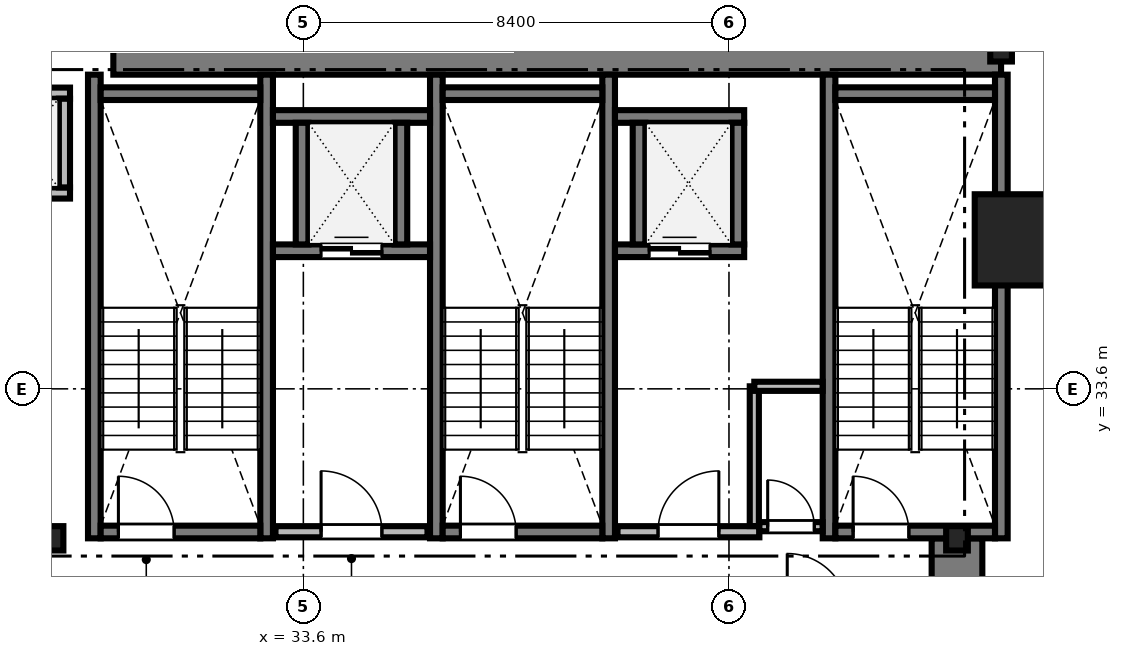
"""IFC4 building model, lengths in metres.
Left out: names, types, materials, properties, quantities, classifications, styles, units other than length and angle.
Written with IfcOpenShell. Run it as: python <this file> out.ifc"""

import sys

from ifc_helpers import new_model, si_unit, direction, frame, frame_2d, origin, origin_2d, place, context, subcontext, project, spatial, rectangle, i_section, extrude, source, transform, mapped, element, fill, save


model = new_model("IFC4")
c1 = context("Model", 3, precision=1e-05, world=origin(), true_north=direction((0.0, 1.0)))
c2 = subcontext(c1, "Body", "Model", "MODEL_VIEW")
j1 = project(units=[si_unit("LENGTHUNIT", "METRE"), si_unit("PLANEANGLEUNIT", "RADIAN")], contexts=[c1])
p1 = place(None, origin())
s1 = spatial("IfcSite", under=j1, at=p1, CompositionType="ELEMENT")
p2 = place(p1, origin())
s2 = spatial("IfcBuilding", under=s1, at=p2, CompositionType="ELEMENT")
p3 = place(p2, frame((0.0, 0.0, 82.35)))
s3 = spatial("IfcBuildingStorey", under=s2, at=p3, CompositionType="ELEMENT", Elevation=82.35)
m1 = source(origin(), c2, "Body", "SweptSolid", [
    extrude(rectangle(XDim=17.52, YDim=1.0, at=frame_2d((8.76, 0.0))), origin(), (0.0, 0.0, 1.0), 3.41),
])
p4 = place(p3, frame((29.85, 40.3, 0.0), z_axis=(0.0, 0.0, 1.0), x_axis=(1.0, 0.0, 0.0)))
e1 = element("IfcWall", 1, at=p4, inside=s3, PredefinedType="SHEAR", context=c2, shape_type="MappedRepresentation", body=[
    mapped(m1, transform((0.0, 0.0, 0.0), scale=1.0)),
])
m2 = source(origin(), c2, "Body", "SweptSolid", [
    extrude(rectangle(XDim=13.15, YDim=1.0, at=frame_2d((6.575, 0.0))), origin(), (0.0, 0.0, 1.0), 3.41),
])
p5 = place(p3, frame((46.5, 17.5, 0.0), z_axis=(0.0, 0.0, 1.0), x_axis=(0.0, 1.0, 0.0)))
e2 = element("IfcWall", 2, at=p5, inside=s3, PredefinedType="SHEAR", context=c2, shape_type="MappedRepresentation", body=[
    mapped(m2, transform((0.0, 0.0, 0.0), scale=1.0)),
])
m3 = source(origin(), c2, "Body", "SweptSolid", [
    extrude(i_section(OverallWidth=0.428, OverallDepth=0.481, WebThickness=0.04, FlangeThickness=0.063, FilletRadius=0.015, at=origin_2d()), origin(), (0.0, 0.0, 1.0), 3.41),
])
for number, where, z_axis, x_axis in (
    (3, (28.65, 30.65, 0.0), (0.0, 0.0, 1.0), (1.0, 0.0, 0.0)),
    (4, (46.5, 30.65, 0.0), (0.0, 0.0, 1.0), (1.0, 0.0, 0.0)),
    (5, (47.37, 40.3, 0.0), (0.0, 0.0, 1.0), (1.0, 0.0, 0.0)),
):
    element("IfcColumn", number, at=place(p3, frame(where, z_axis=z_axis, x_axis=x_axis)), inside=s3, PredefinedType="COLUMN", context=c2, shape_type="MappedRepresentation", body=[
        mapped(m3, transform((0.0, 0.0, 0.0), scale=1.0)),
    ])
m4 = source(origin(), c2, "Body", "SweptSolid", [
    extrude(rectangle(XDim=1.8, YDim=1.8, at=origin_2d()), origin(), (0.0, 0.0, 1.0), 3.41),
])
p6 = place(p3, frame((47.75, 36.54, 0.0), z_axis=(0.0, 0.0, 1.0), x_axis=(1.0, 0.0, 0.0)))
e6 = element("IfcColumn", 6, at=p6, inside=s3, PredefinedType="COLUMN", context=c2, shape_type="MappedRepresentation", body=[
    mapped(m4, transform((0.0, 0.0, 0.0), scale=1.0)),
])
m5 = source(origin(), c2, "Body", "SweptSolid", [
    extrude(rectangle(XDim=9.15, YDim=0.25, at=frame_2d((4.575, 0.0))), origin(), (0.0, 0.0, 1.0), 3.45),
])
for number, where, z_axis, x_axis in (
    (7, (29.475, 30.65, 0.0), (0.0, 0.0, 1.0), (0.0, 1.0, 0.0)),
    (8, (32.875, 30.65, 0.0), (0.0, 0.0, 1.0), (0.0, 1.0, 0.0)),
):
    element("IfcWall", number, at=place(p3, frame(where, z_axis=z_axis, x_axis=x_axis)), inside=s3, PredefinedType="SOLIDWALL", context=c2, shape_type="MappedRepresentation", body=[
        mapped(m5, transform((0.0, 0.0, 0.0), scale=1.0)),
    ])
m6 = source(origin(), c2, "Body", "SweptSolid", [
    extrude(rectangle(XDim=3.15, YDim=0.25, at=frame_2d((1.575, 0.0))), origin(), (0.0, 0.0, 1.0), 3.45),
])
p7 = place(p3, frame((29.6, 39.425, 0.0), z_axis=(0.0, 0.0, 1.0), x_axis=(1.0, 0.0, 0.0)))
e9 = element("IfcWall", 9, at=p7, inside=s3, PredefinedType="SOLIDWALL", context=c2, shape_type="MappedRepresentation", body=[
    mapped(m6, transform((0.0, 0.0, 0.0), scale=1.0)),
])
p8 = place(p3, frame((29.6, 30.775, 0.0), z_axis=(0.0, 0.0, 1.0), x_axis=(1.0, 0.0, 0.0)))
e10 = element("IfcWall", 10, at=p8, inside=s3, PredefinedType="SOLIDWALL", context=c2, shape_type="MappedRepresentation", body=[
    mapped(m6, transform((0.0, 0.0, 0.0), scale=1.0)),
])
m7 = source(origin(), c2, "Body", "SweptSolid", [
    extrude(rectangle(XDim=1.1, YDim=2.2, at=frame_2d((0.55, 1.1))), frame((0.0, 0.135, 0.0), z_axis=(0.0, -1.0, 0.0), x_axis=(1.0, 0.0, 0.0)), (0.0, 0.0, 1.0), 0.27),
])
p9 = place(p8, frame((0.35, 0.0, 0.0)))
e11 = element("IfcOpeningElement", 11, at=p9, cuts=e10, PredefinedType="OPENING", context=c2, shape_type="MappedRepresentation", body=[
    mapped(m7, transform((0.0, 0.0, 0.0), scale=1.0)),
])
for number, where, z_axis, x_axis in (
    (12, (36.225, 30.65, 0.0), (0.0, 0.0, 1.0), (0.0, 1.0, 0.0)),
    (13, (39.625, 30.65, 0.0), (0.0, 0.0, 1.0), (0.0, 1.0, 0.0)),
):
    element("IfcWall", number, at=place(p3, frame(where, z_axis=z_axis, x_axis=x_axis)), inside=s3, PredefinedType="SOLIDWALL", context=c2, shape_type="MappedRepresentation", body=[
        mapped(m5, transform((0.0, 0.0, 0.0), scale=1.0)),
    ])
p10 = place(p3, frame((36.35, 39.425, 0.0), z_axis=(0.0, 0.0, 1.0), x_axis=(1.0, 0.0, 0.0)))
e14 = element("IfcWall", 14, at=p10, inside=s3, PredefinedType="SOLIDWALL", context=c2, shape_type="MappedRepresentation", body=[
    mapped(m6, transform((0.0, 0.0, 0.0), scale=1.0)),
])
p11 = place(p3, frame((36.35, 30.775, 0.0), z_axis=(0.0, 0.0, 1.0), x_axis=(1.0, 0.0, 0.0)))
e15 = element("IfcWall", 15, at=p11, inside=s3, PredefinedType="SOLIDWALL", context=c2, shape_type="MappedRepresentation", body=[
    mapped(m6, transform((0.0, 0.0, 0.0), scale=1.0)),
])
p12 = place(p11, frame((0.35, 0.0, 0.0)))
e16 = element("IfcOpeningElement", 16, at=p12, cuts=e15, PredefinedType="OPENING", context=c2, shape_type="MappedRepresentation", body=[
    mapped(m7, transform((0.0, 0.0, 0.0), scale=1.0)),
])
for number, where, z_axis, x_axis in (
    (17, (43.975, 30.65, 0.0), (0.0, 0.0, 1.0), (0.0, 1.0, 0.0)),
    (18, (47.375, 30.65, 0.0), (0.0, 0.0, 1.0), (0.0, 1.0, 0.0)),
):
    element("IfcWall", number, at=place(p3, frame(where, z_axis=z_axis, x_axis=x_axis)), inside=s3, PredefinedType="SOLIDWALL", context=c2, shape_type="MappedRepresentation", body=[
        mapped(m5, transform((0.0, 0.0, 0.0), scale=1.0)),
    ])
p13 = place(p3, frame((44.1, 39.425, 0.0), z_axis=(0.0, 0.0, 1.0), x_axis=(1.0, 0.0, 0.0)))
e19 = element("IfcWall", 19, at=p13, inside=s3, PredefinedType="SOLIDWALL", context=c2, shape_type="MappedRepresentation", body=[
    mapped(m6, transform((0.0, 0.0, 0.0), scale=1.0)),
])
p14 = place(p3, frame((44.1, 30.775, 0.0), z_axis=(0.0, 0.0, 1.0), x_axis=(1.0, 0.0, 0.0)))
e20 = element("IfcWall", 20, at=p14, inside=s3, PredefinedType="SOLIDWALL", context=c2, shape_type="MappedRepresentation", body=[
    mapped(m6, transform((0.0, 0.0, 0.0), scale=1.0)),
])
p15 = place(p14, frame((0.35, 0.0, 0.0)))
e21 = element("IfcOpeningElement", 21, at=p15, cuts=e20, PredefinedType="OPENING", context=c2, shape_type="MappedRepresentation", body=[
    mapped(m7, transform((0.0, 0.0, 0.0), scale=1.0)),
])
m8 = source(origin(), c2, "Body", "SweptSolid", [
    extrude(rectangle(XDim=3.0, YDim=0.22, at=frame_2d((1.5, 0.0))), origin(), (0.0, 0.0, 1.0), 3.41),
])
p16 = place(p3, frame((33.05, 30.78, 0.0), z_axis=(0.0, 0.0, 1.0), x_axis=(1.0, 0.0, 0.0)))
e22 = element("IfcWall", 22, at=p16, inside=s3, PredefinedType="SOLIDWALL", context=c2, shape_type="MappedRepresentation", body=[
    mapped(m8, transform((0.0, 0.0, 0.0), scale=1.0)),
])
m9 = source(origin(), c2, "Body", "SweptSolid", [
    extrude(rectangle(XDim=1.2, YDim=2.2, at=frame_2d((0.6, 1.1))), frame((0.0, 0.12, 0.0), z_axis=(0.0, -1.0, 0.0), x_axis=(1.0, 0.0, 0.0)), (0.0, 0.0, 1.0), 0.24),
])
p17 = place(p16, frame((0.9, 0.0, 0.0)))
e23 = element("IfcOpeningElement", 23, at=p17, cuts=e22, PredefinedType="OPENING", context=c2, shape_type="MappedRepresentation", body=[
    mapped(m9, transform((0.0, 0.0, 0.0), scale=1.0)),
])
m10 = source(origin(), c2, "Body", "SweptSolid", [
    extrude(rectangle(XDim=2.8, YDim=0.22, at=frame_2d((1.4, 0.0))), origin(), (0.0, 0.0, 1.0), 3.41),
])
p18 = place(p3, frame((39.8, 30.78, 0.0), z_axis=(0.0, 0.0, 1.0), x_axis=(1.0, 0.0, 0.0)))
e24 = element("IfcWall", 24, at=p18, inside=s3, PredefinedType="SOLIDWALL", context=c2, shape_type="MappedRepresentation", body=[
    mapped(m10, transform((0.0, 0.0, 0.0), scale=1.0)),
])
p19 = place(p18, frame((0.8, 0.0, 0.0)))
e25 = element("IfcOpeningElement", 25, at=p19, cuts=e24, PredefinedType="OPENING", context=c2, shape_type="MappedRepresentation", body=[
    mapped(m9, transform((0.0, 0.0, 0.0), scale=1.0)),
])
m11 = source(origin(), c2, "Body", "SweptSolid", [
    extrude(rectangle(XDim=1.99, YDim=0.22, at=frame_2d((0.995, 0.0))), origin(), (0.0, 0.0, 1.0), 3.41),
])
p20 = place(p3, frame((27.005, 37.465, 0.0), z_axis=(0.0, 0.0, 1.0), x_axis=(1.0, 0.0, 0.0)))
e26 = element("IfcWall", 26, at=p20, inside=s3, PredefinedType="SOLIDWALL", context=c2, shape_type="MappedRepresentation", body=[
    mapped(m11, transform((0.0, 0.0, 0.0), scale=1.0)),
])
m12 = source(origin(), c2, "Body", "SweptSolid", [
    extrude(rectangle(XDim=1.1, YDim=2.2, at=frame_2d((0.55, 1.1))), frame((0.0, 0.12, 0.0), z_axis=(0.0, -1.0, 0.0), x_axis=(1.0, 0.0, 0.0)), (0.0, 0.0, 1.0), 0.24),
])
p21 = place(p20, frame((0.445, 0.0, 0.0)))
e27 = element("IfcOpeningElement", 27, at=p21, cuts=e26, PredefinedType="OPENING", context=c2, shape_type="MappedRepresentation", body=[
    mapped(m12, transform((0.0, 0.0, 0.0), scale=1.0)),
])
p22 = place(p3, frame((27.005, 39.435, 0.0), z_axis=(0.0, 0.0, 1.0), x_axis=(1.0, 0.0, 0.0)))
e28 = element("IfcWall", 28, at=p22, inside=s3, PredefinedType="SOLIDWALL", context=c2, shape_type="MappedRepresentation", body=[
    mapped(m11, transform((0.0, 0.0, 0.0), scale=1.0)),
])
m13 = source(origin(), c2, "Body", "SweptSolid", [
    extrude(rectangle(XDim=1.75, YDim=0.22, at=frame_2d((0.875, 0.0))), origin(), (0.0, 0.0, 1.0), 3.41),
])
p23 = place(p3, frame((28.885, 37.575, 0.0), z_axis=(0.0, 0.0, 1.0), x_axis=(0.0, 1.0, 0.0)))
e29 = element("IfcWall", 29, at=p23, inside=s3, PredefinedType="SOLIDWALL", context=c2, shape_type="MappedRepresentation", body=[
    mapped(m13, transform((0.0, 0.0, 0.0), scale=1.0)),
])
m14 = source(origin(), c2, "Body", "SweptSolid", [
    extrude(rectangle(XDim=3.1, YDim=0.25, at=frame_2d((1.55, 0.0))), origin(), (0.0, 0.0, 1.0), 3.41),
])
p24 = place(p3, frame((33.0, 36.325, 0.0), z_axis=(0.0, 0.0, 1.0), x_axis=(1.0, 0.0, 0.0)))
e30 = element("IfcWall", 30, at=p24, inside=s3, PredefinedType="SOLIDWALL", context=c2, shape_type="MappedRepresentation", body=[
    mapped(m14, transform((0.0, 0.0, 0.0), scale=1.0)),
])
m15 = source(origin(), c2, "Body", "SweptSolid", [
    extrude(rectangle(XDim=1.2, YDim=2.25, at=frame_2d((0.6, 1.125))), frame((0.0, 0.135, 0.0), z_axis=(0.0, -1.0, 0.0), x_axis=(1.0, 0.0, 0.0)), (0.0, 0.0, 1.0), 0.27),
])
p25 = place(p24, frame((0.95, 0.0, 0.0)))
e31 = element("IfcOpeningElement", 31, at=p25, cuts=e30, PredefinedType="OPENING", context=c2, shape_type="MappedRepresentation", body=[
    mapped(m15, transform((0.0, 0.0, 0.0), scale=1.0)),
])
p26 = place(p3, frame((33.0, 38.975, 0.0), z_axis=(0.0, 0.0, 1.0), x_axis=(1.0, 0.0, 0.0)))
e32 = element("IfcWall", 32, at=p26, inside=s3, PredefinedType="SOLIDWALL", context=c2, shape_type="MappedRepresentation", body=[
    mapped(m14, transform((0.0, 0.0, 0.0), scale=1.0)),
])
m16 = source(origin(), c2, "Body", "SweptSolid", [
    extrude(rectangle(XDim=2.4, YDim=0.25, at=frame_2d((1.2, 0.0))), origin(), (0.0, 0.0, 1.0), 3.41),
])
for number, where, z_axis, x_axis in (
    (33, (33.575, 36.45, 0.0), (0.0, 0.0, 1.0), (0.0, 1.0, 0.0)),
    (34, (35.525, 36.45, 0.0), (0.0, 0.0, 1.0), (0.0, 1.0, 0.0)),
):
    element("IfcWall", number, at=place(p3, frame(where, z_axis=z_axis, x_axis=x_axis)), inside=s3, PredefinedType="SOLIDWALL", context=c2, shape_type="MappedRepresentation", body=[
        mapped(m16, transform((0.0, 0.0, 0.0), scale=1.0)),
    ])
m17 = source(origin(), c2, "Body", "SweptSolid", [
    extrude(rectangle(XDim=2.55, YDim=0.25, at=frame_2d((1.275, 0.0))), origin(), (0.0, 0.0, 1.0), 3.41),
])
p27 = place(p3, frame((39.75, 36.325, 0.0), z_axis=(0.0, 0.0, 1.0), x_axis=(1.0, 0.0, 0.0)))
e35 = element("IfcWall", 35, at=p27, inside=s3, PredefinedType="SOLIDWALL", context=c2, shape_type="MappedRepresentation", body=[
    mapped(m17, transform((0.0, 0.0, 0.0), scale=1.0)),
])
p28 = place(p27, frame((0.675, 0.0, 0.0)))
e36 = element("IfcOpeningElement", 36, at=p28, cuts=e35, PredefinedType="OPENING", context=c2, shape_type="MappedRepresentation", body=[
    mapped(m15, transform((0.0, 0.0, 0.0), scale=1.0)),
])
p29 = place(p3, frame((39.75, 38.975, 0.0), z_axis=(0.0, 0.0, 1.0), x_axis=(1.0, 0.0, 0.0)))
e37 = element("IfcWall", 37, at=p29, inside=s3, PredefinedType="SOLIDWALL", context=c2, shape_type="MappedRepresentation", body=[
    mapped(m17, transform((0.0, 0.0, 0.0), scale=1.0)),
])
for number, where, z_axis, x_axis in (
    (38, (40.225, 36.45, 0.0), (0.0, 0.0, 1.0), (0.0, 1.0, 0.0)),
    (39, (42.175, 36.45, 0.0), (0.0, 0.0, 1.0), (0.0, 1.0, 0.0)),
):
    element("IfcWall", number, at=place(p3, frame(where, z_axis=z_axis, x_axis=x_axis)), inside=s3, PredefinedType="SOLIDWALL", context=c2, shape_type="MappedRepresentation", body=[
        mapped(m16, transform((0.0, 0.0, 0.0), scale=1.0)),
    ])
m18 = source(origin(), c2, "Body", "SweptSolid", [
    extrude(rectangle(XDim=1.248, YDim=0.18, at=frame_2d((0.624, 0.0))), origin(), (0.0, 0.0, 1.0), 3.41),
])
p30 = place(p3, frame((42.6, 30.88, 0.0), z_axis=(0.0, 0.0, 1.0), x_axis=(1.0, 0.0, 0.0)))
e40 = element("IfcWall", 40, at=p30, inside=s3, PredefinedType="PARTITIONING", context=c2, shape_type="MappedRepresentation", body=[
    mapped(m18, transform((0.0, 0.0, 0.0), scale=1.0)),
])
m19 = source(origin(), c2, "Body", "SweptSolid", [
    extrude(rectangle(XDim=0.92, YDim=2.1, at=frame_2d((0.46, 1.05))), frame((0.0, 0.1, 0.0), z_axis=(0.0, -1.0, 0.0), x_axis=(1.0, 0.0, 0.0)), (0.0, 0.0, 1.0), 0.2),
])
p31 = place(p30, frame((0.164, 0.0, 0.0)))
e41 = element("IfcOpeningElement", 41, at=p31, cuts=e40, PredefinedType="OPENING", context=c2, shape_type="MappedRepresentation", body=[
    mapped(m19, transform((0.0, 0.0, 0.0), scale=1.0)),
])
m20 = source(origin(), c2, "Body", "SweptSolid", [
    extrude(rectangle(XDim=2.758, YDim=0.18, at=frame_2d((1.379, 0.0))), origin(), (0.0, 0.0, 1.0), 3.41),
])
p32 = place(p3, frame((42.5, 30.892, 0.0), z_axis=(0.0, 0.0, 1.0), x_axis=(0.0, 1.0, 0.0)))
e42 = element("IfcWall", 42, at=p32, inside=s3, PredefinedType="PARTITIONING", context=c2, shape_type="MappedRepresentation", body=[
    mapped(m20, transform((0.0, 0.0, 0.0), scale=1.0)),
])
m21 = source(origin(), c2, "Body", "SweptSolid", [
    extrude(rectangle(XDim=1.348, YDim=0.18, at=frame_2d((0.674, 0.0))), origin(), (0.0, 0.0, 1.0), 3.41),
])
p33 = place(p3, frame((42.5, 33.65, 0.0), z_axis=(0.0, 0.0, 1.0), x_axis=(1.0, 0.0, 0.0)))
e43 = element("IfcWall", 43, at=p33, inside=s3, PredefinedType="PARTITIONING", context=c2, shape_type="MappedRepresentation", body=[
    mapped(m21, transform((0.0, 0.0, 0.0), scale=1.0)),
])
m22 = source(origin(), c2, "Body", "SweptSolid", [
    extrude(rectangle(XDim=1.1, YDim=2.2, at=frame_2d((0.55, 1.1))), frame((0.0, 0.025, 0.0), z_axis=(0.0, -1.0, 0.0), x_axis=(1.0, 0.0, 0.0)), (0.0, 0.0, 1.0), 0.05),
])
p34 = place(p9, origin())
e44 = element("IfcDoor", 44, at=p34, inside=s3, OperationType="SINGLE_SWING_LEFT", PredefinedType="DOOR", context=c2, shape_type="MappedRepresentation", body=[
    mapped(m22, transform((0.0, 0.0, 0.0), scale=1.0)),
])
fill(e11, e44)
p35 = place(p12, origin())
e45 = element("IfcDoor", 45, at=p35, inside=s3, OperationType="SINGLE_SWING_LEFT", PredefinedType="DOOR", context=c2, shape_type="MappedRepresentation", body=[
    mapped(m22, transform((0.0, 0.0, 0.0), scale=1.0)),
])
fill(e16, e45)
p36 = place(p15, origin())
e46 = element("IfcDoor", 46, at=p36, inside=s3, OperationType="SINGLE_SWING_LEFT", PredefinedType="DOOR", context=c2, shape_type="MappedRepresentation", body=[
    mapped(m22, transform((0.0, 0.0, 0.0), scale=1.0)),
])
fill(e21, e46)
m23 = source(origin(), c2, "Body", "SweptSolid", [
    extrude(rectangle(XDim=1.2, YDim=2.2, at=frame_2d((0.6, 1.1))), frame((0.0, 0.025, 0.0), z_axis=(0.0, -1.0, 0.0), x_axis=(1.0, 0.0, 0.0)), (0.0, 0.0, 1.0), 0.05),
])
p37 = place(p17, origin())
e47 = element("IfcDoor", 47, at=p37, inside=s3, OperationType="SINGLE_SWING_LEFT", PredefinedType="DOOR", context=c2, shape_type="MappedRepresentation", body=[
    mapped(m23, transform((0.0, 0.0, 0.0), scale=1.0)),
])
fill(e23, e47)
p38 = place(p19, origin())
e48 = element("IfcDoor", 48, at=p38, inside=s3, OperationType="SINGLE_SWING_RIGHT", PredefinedType="DOOR", context=c2, shape_type="MappedRepresentation", body=[
    mapped(m23, transform((0.0, 0.0, 0.0), scale=1.0)),
])
fill(e25, e48)
m24 = source(origin(), c2, "Body", "SweptSolid", [
    extrude(rectangle(XDim=1.2, YDim=2.25, at=frame_2d((0.6, 1.125))), frame((0.0, 0.025, 0.0), z_axis=(0.0, -1.0, 0.0), x_axis=(1.0, 0.0, 0.0)), (0.0, 0.0, 1.0), 0.05),
])
p39 = place(p25, origin())
e49 = element("IfcDoor", 49, at=p39, inside=s3, OperationType="DOUBLE_DOOR_SLIDING", PredefinedType="DOOR", context=c2, shape_type="MappedRepresentation", body=[
    mapped(m24, transform((0.0, 0.0, 0.0), scale=1.0)),
])
fill(e31, e49)
p40 = place(p28, origin())
e50 = element("IfcDoor", 50, at=p40, inside=s3, OperationType="DOUBLE_DOOR_SLIDING", PredefinedType="DOOR", context=c2, shape_type="MappedRepresentation", body=[
    mapped(m24, transform((0.0, 0.0, 0.0), scale=1.0)),
])
fill(e36, e50)
m25 = source(origin(), c2, "Body", "SweptSolid", [
    extrude(rectangle(XDim=0.92, YDim=2.1, at=frame_2d((0.46, 1.05))), frame((0.0, 0.025, 0.0), z_axis=(0.0, -1.0, 0.0), x_axis=(1.0, 0.0, 0.0)), (0.0, 0.0, 1.0), 0.05),
])
p41 = place(p31, origin())
e51 = element("IfcDoor", 51, at=p41, inside=s3, OperationType="SINGLE_SWING_LEFT", PredefinedType="DOOR", context=c2, shape_type="MappedRepresentation", body=[
    mapped(m25, transform((0.0, 0.0, 0.0), scale=1.0)),
])
fill(e41, e51)
save(model, sys.argv[1])
